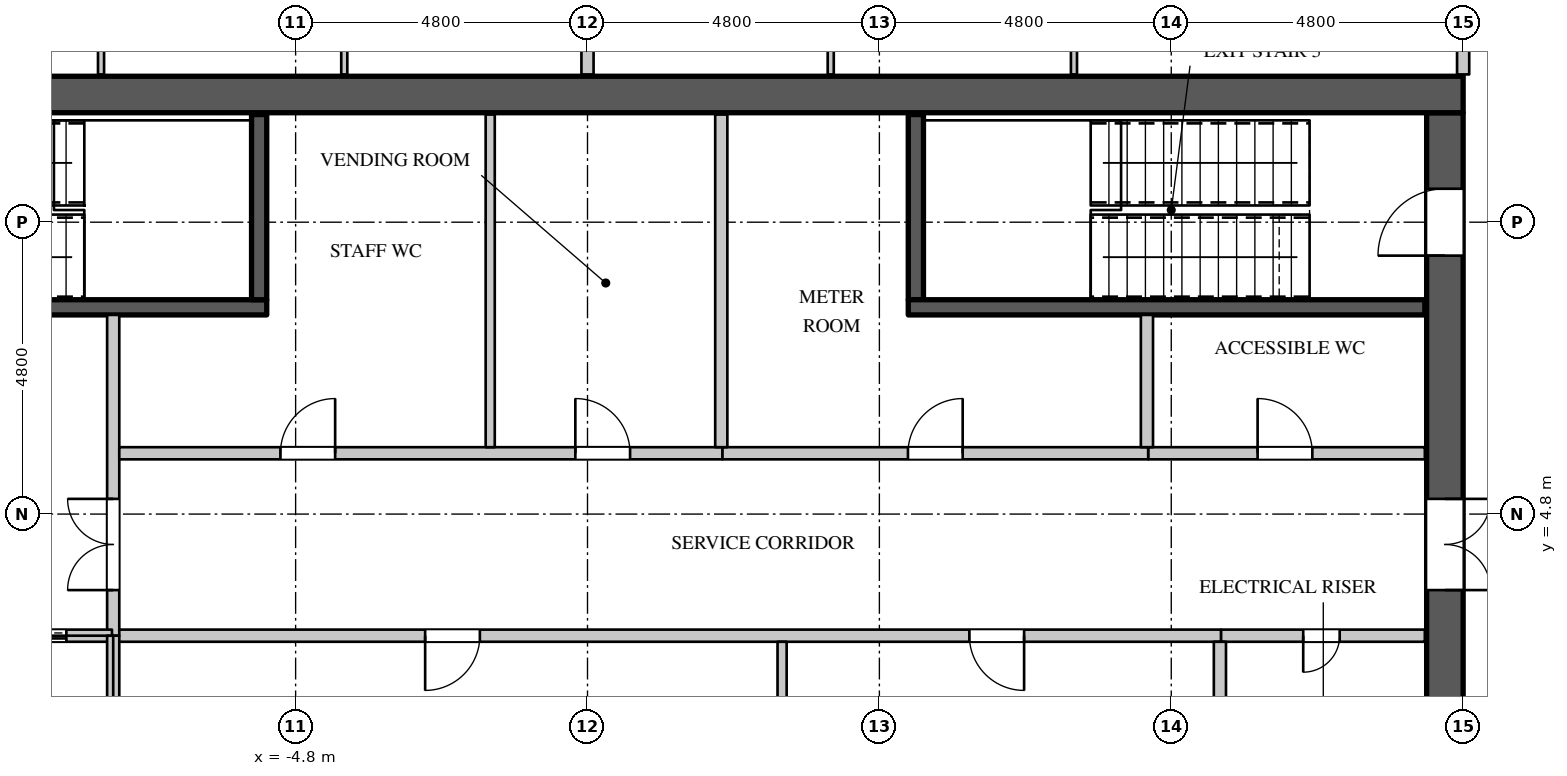
"""IFC4 building model, lengths in metres.
Left out: names, types, materials, properties, quantities, classifications, styles, units other than length and angle.
Written with IfcOpenShell. Run it as: python <this file> out.ifc"""

import sys

from ifc_helpers import new_model, si_unit, direction, frame, frame_2d, origin, place, context, subcontext, project, spatial, rectangle, extrude, element, fill, save


model = new_model("IFC4")
c1 = context("Model", 3, precision=1e-05, world=origin(), true_north=direction((0.0, 1.0)))
c2 = subcontext(c1, "Body", "Model", "MODEL_VIEW")
j1 = project(units=[si_unit("LENGTHUNIT", "METRE"), si_unit("PLANEANGLEUNIT", "RADIAN")], contexts=[c1])
p1 = place(None, origin())
s1 = spatial("IfcSite", under=j1, at=p1, CompositionType="ELEMENT")
p2 = place(p1, origin())
s2 = spatial("IfcBuilding", under=s1, at=p2, CompositionType="ELEMENT")
p3 = place(p2, frame((0.0, 0.0, 239.1)))
s3 = spatial("IfcBuildingStorey", under=s2, at=p3, CompositionType="ELEMENT", Elevation=239.1)
p4 = place(p3, frame((-14.4, 11.7, 0.0), z_axis=(0.0, 0.0, 1.0), x_axis=(1.0, 0.0, 0.0)))
e1 = element("IfcWall", 1, at=p4, inside=s3, PredefinedType="SHEAR", context=c2, shape_type="SweptSolid", body=[
    extrude(rectangle(XDim=28.8, YDim=0.6, at=frame_2d((14.4, 0.0))), origin(), (0.0, 0.0, 1.0), 4.2),
])
p5 = place(p3, frame((14.1, -11.4, 0.0), z_axis=(0.0, 0.0, 1.0), x_axis=(0.0, 1.0, 0.0)))
e2 = element("IfcWall", 2, at=p5, inside=s3, PredefinedType="SHEAR", context=c2, shape_type="SweptSolid", body=[
    extrude(rectangle(XDim=22.8, YDim=0.6, at=frame_2d((11.4, 0.0))), origin(), (0.0, 0.0, 1.0), 4.2),
])
p6 = place(p5, frame((20.45, 0.0, 0.0)))
e3 = element("IfcOpeningElement", 3, at=p6, cuts=e2, PredefinedType="OPENING", context=c2, shape_type="SweptSolid", body=[
    extrude(rectangle(XDim=1.1, YDim=2.2, at=frame_2d((0.55, 1.1))), frame((0.0, 0.31, 0.0), z_axis=(0.0, -1.0, 0.0), x_axis=(1.0, 0.0, 0.0)), (0.0, 0.0, 1.0), 0.62),
])
p7 = place(p5, frame((1.25, 0.0, 0.0)))
e4 = element("IfcOpeningElement", 4, at=p7, cuts=e2, PredefinedType="OPENING", context=c2, shape_type="SweptSolid", body=[
    extrude(rectangle(XDim=1.1, YDim=2.2, at=frame_2d((0.55, 1.1))), frame((0.0, 0.31, 0.0), z_axis=(0.0, -1.0, 0.0), x_axis=(1.0, 0.0, 0.0)), (0.0, 0.0, 1.0), 0.62),
])
p8 = place(p5, frame((14.95, 0.0, 0.0)))
e5 = element("IfcOpeningElement", 5, at=p8, cuts=e2, PredefinedType="OPENING", context=c2, shape_type="SweptSolid", body=[
    extrude(rectangle(XDim=1.5, YDim=2.4, at=frame_2d((0.75, 1.2))), frame((0.0, 0.31, 0.0), z_axis=(0.0, -1.0, 0.0), x_axis=(1.0, 0.0, 0.0)), (0.0, 0.0, 1.0), 0.62),
])
p9 = place(p5, frame((6.35, 0.0, 0.0)))
e6 = element("IfcOpeningElement", 6, at=p9, cuts=e2, PredefinedType="OPENING", context=c2, shape_type="SweptSolid", body=[
    extrude(rectangle(XDim=1.5, YDim=2.4, at=frame_2d((0.75, 1.2))), frame((0.0, 0.31, 0.0), z_axis=(0.0, -1.0, 0.0), x_axis=(1.0, 0.0, 0.0)), (0.0, 0.0, 1.0), 0.62),
])
p10 = place(p3, frame((-7.82, 2.8, 0.0), z_axis=(0.0, 0.0, 1.0), x_axis=(1.0, 0.0, 0.0)))
e7 = element("IfcWall", 7, at=p10, inside=s3, PredefinedType="PARTITIONING", context=c2, shape_type="SweptSolid", body=[
    extrude(rectangle(XDim=18.24, YDim=0.2, at=frame_2d((9.12, 0.0))), origin(), (0.0, 0.0, 1.0), 3.95),
])
p11 = place(p10, frame((5.15, 0.0, 0.0)))
e8 = element("IfcOpeningElement", 8, at=p11, cuts=e7, PredefinedType="OPENING", context=c2, shape_type="SweptSolid", body=[
    extrude(rectangle(XDim=0.9, YDim=2.2, at=frame_2d((0.45, 1.1))), frame((0.0, 0.11, 0.0), z_axis=(0.0, -1.0, 0.0), x_axis=(1.0, 0.0, 0.0)), (0.0, 0.0, 1.0), 0.22),
])
p12 = place(p10, frame((14.1, 0.0, 0.0)))
e9 = element("IfcOpeningElement", 9, at=p12, cuts=e7, PredefinedType="OPENING", context=c2, shape_type="SweptSolid", body=[
    extrude(rectangle(XDim=0.9, YDim=2.2, at=frame_2d((0.45, 1.1))), frame((0.0, 0.11, 0.0), z_axis=(0.0, -1.0, 0.0), x_axis=(1.0, 0.0, 0.0)), (0.0, 0.0, 1.0), 0.22),
])
p13 = place(p3, frame((-7.8, 2.8, 0.0), z_axis=(0.0, 0.0, 1.0), x_axis=(0.0, 1.0, 0.0)))
e10 = element("IfcWall", 10, at=p13, inside=s3, PredefinedType="PARTITIONING", context=c2, shape_type="SweptSolid", body=[
    extrude(rectangle(XDim=5.275, YDim=0.2, at=frame_2d((2.637, 0.0))), origin(), (0.0, 0.0, 1.0), 3.95),
])
p14 = place(p13, frame((0.75, 0.0, 0.0)))
e11 = element("IfcOpeningElement", 11, at=p14, cuts=e10, PredefinedType="OPENING", context=c2, shape_type="SweptSolid", body=[
    extrude(rectangle(XDim=1.5, YDim=2.4, at=frame_2d((0.75, 1.2))), frame((0.0, 0.11, 0.0), z_axis=(0.0, -1.0, 0.0), x_axis=(1.0, 0.0, 0.0)), (0.0, 0.0, 1.0), 0.22),
])
p15 = place(p3, frame((-7.7, 5.8, 0.0), z_axis=(0.0, 0.0, 1.0), x_axis=(1.0, 0.0, 0.0)))
e12 = element("IfcWall", 12, at=p15, inside=s3, PredefinedType="PARTITIONING", context=c2, shape_type="SweptSolid", body=[
    extrude(rectangle(XDim=9.92, YDim=0.2, at=frame_2d((4.96, 0.0))), origin(), (0.0, 0.0, 1.0), 3.95),
])
p16 = place(p15, frame((2.65, 0.0, 0.0)))
e13 = element("IfcOpeningElement", 13, at=p16, cuts=e12, PredefinedType="OPENING", context=c2, shape_type="SweptSolid", body=[
    extrude(rectangle(XDim=0.9, YDim=2.2, at=frame_2d((0.45, 1.1))), frame((0.0, 0.11, 0.0), z_axis=(0.0, -1.0, 0.0), x_axis=(1.0, 0.0, 0.0)), (0.0, 0.0, 1.0), 0.22),
])
p17 = place(p15, frame((7.5, 0.0, 0.0)))
e14 = element("IfcOpeningElement", 14, at=p17, cuts=e12, PredefinedType="OPENING", context=c2, shape_type="SweptSolid", body=[
    extrude(rectangle(XDim=0.9, YDim=2.2, at=frame_2d((0.45, 1.1))), frame((0.0, 0.11, 0.0), z_axis=(0.0, -1.0, 0.0), x_axis=(1.0, 0.0, 0.0)), (0.0, 0.0, 1.0), 0.22),
])
p18 = place(p3, frame((9.22, 5.8, 0.0), z_axis=(0.0, 0.0, 1.0), x_axis=(1.0, 0.0, 0.0)))
e15 = element("IfcWall", 15, at=p18, inside=s3, PredefinedType="PARTITIONING", context=c2, shape_type="SweptSolid", body=[
    extrude(rectangle(XDim=4.55, YDim=0.2, at=frame_2d((2.275, 0.0))), origin(), (0.0, 0.0, 1.0), 3.95),
])
p19 = place(p18, frame((1.8, 0.0, 0.0)))
e16 = element("IfcOpeningElement", 16, at=p19, cuts=e15, PredefinedType="OPENING", context=c2, shape_type="SweptSolid", body=[
    extrude(rectangle(XDim=0.9, YDim=2.2, at=frame_2d((0.45, 1.1))), frame((0.0, 0.11, 0.0), z_axis=(0.0, -1.0, 0.0), x_axis=(1.0, 0.0, 0.0)), (0.0, 0.0, 1.0), 0.22),
])
p20 = place(p3, frame((14.4, 12.03, 0.0), z_axis=(0.0, 0.0, 1.0), x_axis=(0.0, 1.0, 0.0)))
e17 = element("IfcWall", 17, at=p20, inside=s3, PredefinedType="PARTITIONING", context=c2, shape_type="SweptSolid", body=[
    extrude(rectangle(XDim=2.27, YDim=0.2, at=frame_2d((1.135, 0.0))), origin(), (0.0, 0.0, 1.0), 3.95),
])
p21 = place(p3, frame((-1.6, 5.9, 0.0), z_axis=(0.0, 0.0, 1.0), x_axis=(0.0, 1.0, 0.0)))
e18 = element("IfcWall", 18, at=p21, inside=s3, PredefinedType="PARTITIONING", context=c2, shape_type="SweptSolid", body=[
    extrude(rectangle(XDim=5.47, YDim=0.15, at=frame_2d((2.735, 0.0))), origin(), (0.0, 0.0, 1.0), 3.95),
])
p22 = place(p3, frame((3.2, 0.1, 0.0), z_axis=(0.0, 0.0, 1.0), x_axis=(0.0, 1.0, 0.0)))
e19 = element("IfcWall", 19, at=p22, inside=s3, PredefinedType="PARTITIONING", context=c2, shape_type="SweptSolid", body=[
    extrude(rectangle(XDim=2.6, YDim=0.15, at=frame_2d((1.3, 0.0))), origin(), (0.0, 0.0, 1.0), 3.95),
])
p23 = place(p3, frame((0.0, 12.03, 0.0), z_axis=(0.0, 0.0, 1.0), x_axis=(0.0, 1.0, 0.0)))
e20 = element("IfcWall", 20, at=p23, inside=s3, PredefinedType="PARTITIONING", context=c2, shape_type="SweptSolid", body=[
    extrude(rectangle(XDim=14.395, YDim=0.2, at=frame_2d((7.198, 0.0))), origin(), (0.0, 0.0, 1.0), 3.95),
])
p24 = place(p3, frame((2.22, 5.8, 0.0), z_axis=(0.0, 0.0, 1.0), x_axis=(1.0, 0.0, 0.0)))
e21 = element("IfcWall", 21, at=p24, inside=s3, PredefinedType="PARTITIONING", context=c2, shape_type="SweptSolid", body=[
    extrude(rectangle(XDim=7.0, YDim=0.2, at=frame_2d((3.5, 0.0))), origin(), (0.0, 0.0, 1.0), 3.95),
])
p25 = place(p24, frame((3.05, 0.0, 0.0)))
e22 = element("IfcOpeningElement", 22, at=p25, cuts=e21, PredefinedType="OPENING", context=c2, shape_type="SweptSolid", body=[
    extrude(rectangle(XDim=0.9, YDim=2.2, at=frame_2d((0.45, 1.1))), frame((0.0, 0.11, 0.0), z_axis=(0.0, -1.0, 0.0), x_axis=(1.0, 0.0, 0.0)), (0.0, 0.0, 1.0), 0.22),
])
p26 = place(p3, frame((2.2, 5.9, 0.0), z_axis=(0.0, 0.0, 1.0), x_axis=(0.0, 1.0, 0.0)))
e23 = element("IfcWall", 23, at=p26, inside=s3, PredefinedType="PARTITIONING", context=c2, shape_type="SweptSolid", body=[
    extrude(rectangle(XDim=5.47, YDim=0.2, at=frame_2d((2.735, 0.0))), origin(), (0.0, 0.0, 1.0), 3.95),
])
p27 = place(p3, frame((9.2, 5.9, 0.0), z_axis=(0.0, 0.0, 1.0), x_axis=(0.0, 1.0, 0.0)))
e24 = element("IfcWall", 24, at=p27, inside=s3, PredefinedType="PARTITIONING", context=c2, shape_type="SweptSolid", body=[
    extrude(rectangle(XDim=2.175, YDim=0.2, at=frame_2d((1.087, 0.0))), origin(), (0.0, 0.0, 1.0), 3.95),
])
p28 = place(p3, frame((10.42, 2.8, 0.0), z_axis=(0.0, 0.0, 1.0), x_axis=(1.0, 0.0, 0.0)))
e25 = element("IfcWall", 25, at=p28, inside=s3, PredefinedType="PARTITIONING", context=c2, shape_type="SweptSolid", body=[
    extrude(rectangle(XDim=3.35, YDim=0.2, at=frame_2d((1.675, 0.0))), origin(), (0.0, 0.0, 1.0), 3.95),
])
p29 = place(p28, frame((1.35, 0.0, 0.0)))
e26 = element("IfcOpeningElement", 26, at=p29, cuts=e25, PredefinedType="OPENING", context=c2, shape_type="SweptSolid", body=[
    extrude(rectangle(XDim=0.6, YDim=2.0, at=frame_2d((0.3, 1.0))), frame((0.0, 0.11, 0.0), z_axis=(0.0, -1.0, 0.0), x_axis=(1.0, 0.0, 0.0)), (0.0, 0.0, 1.0), 0.22),
])
p30 = place(p3, frame((10.4, 0.1, 0.0), z_axis=(0.0, 0.0, 1.0), x_axis=(0.0, 1.0, 0.0)))
e27 = element("IfcWall", 27, at=p30, inside=s3, PredefinedType="PARTITIONING", context=c2, shape_type="SweptSolid", body=[
    extrude(rectangle(XDim=2.6, YDim=0.2, at=frame_2d((1.3, 0.0))), origin(), (0.0, 0.0, 1.0), 3.95),
])
p31 = place(p3, frame((-13.77, 2.8, 0.0), z_axis=(0.0, 0.0, 1.0), x_axis=(1.0, 0.0, 0.0)))
e28 = element("IfcWall", 28, at=p31, inside=s3, PredefinedType="PARTITIONING", context=c2, shape_type="SweptSolid", body=[
    extrude(rectangle(XDim=5.95, YDim=0.2, at=frame_2d((2.975, 0.0))), origin(), (0.0, 0.0, 1.0), 3.95),
])
p32 = place(p31, frame((1.1, 0.0, 0.0)))
e29 = element("IfcOpeningElement", 29, at=p32, cuts=e28, PredefinedType="OPENING", context=c2, shape_type="SweptSolid", body=[
    extrude(rectangle(XDim=1.1, YDim=2.2, at=frame_2d((0.55, 1.1))), frame((0.0, 0.11, 0.0), z_axis=(0.0, -1.0, 0.0), x_axis=(1.0, 0.0, 0.0)), (0.0, 0.0, 1.0), 0.22),
])
p33 = place(p31, frame((4.1, 0.0, 0.0)))
e30 = element("IfcOpeningElement", 30, at=p33, cuts=e28, PredefinedType="OPENING", context=c2, shape_type="SweptSolid", body=[
    extrude(rectangle(XDim=1.1, YDim=2.2, at=frame_2d((0.55, 1.1))), frame((0.0, 0.11, 0.0), z_axis=(0.0, -1.0, 0.0), x_axis=(1.0, 0.0, 0.0)), (0.0, 0.0, 1.0), 0.22),
])
p34 = place(p3, frame((-7.8, 0.0, 0.0), z_axis=(0.0, 0.0, 1.0), x_axis=(0.0, 1.0, 0.0)))
e31 = element("IfcWall", 31, at=p34, inside=s3, PredefinedType="PARTITIONING", context=c2, shape_type="SweptSolid", body=[
    extrude(rectangle(XDim=2.8, YDim=0.2, at=frame_2d((1.4, 0.0))), origin(), (0.0, 0.0, 1.0), 3.95),
])
p35 = place(p3, frame((-13.77, 8.2, 0.0), z_axis=(0.0, 0.0, 1.0), x_axis=(1.0, 0.0, 0.0)))
e32 = element("IfcWall", 32, at=p35, inside=s3, PredefinedType="SHEAR", context=c2, shape_type="SweptSolid", body=[
    extrude(rectangle(XDim=8.495, YDim=0.25, at=frame_2d((4.248, 0.0))), origin(), (0.0, 0.0, 1.0), 3.95),
])
p36 = place(p35, frame((0.15, 0.0, 0.0)))
e33 = element("IfcOpeningElement", 33, at=p36, cuts=e32, PredefinedType="OPENING", context=c2, shape_type="SweptSolid", body=[
    extrude(rectangle(XDim=1.1, YDim=2.2, at=frame_2d((0.55, 1.1))), frame((0.0, 0.135, 0.0), z_axis=(0.0, -1.0, 0.0), x_axis=(1.0, 0.0, 0.0)), (0.0, 0.0, 1.0), 0.27),
])
for number, where, z_axis, x_axis in (
    (34, (-5.4, 8.325, 0.0), (0.0, 0.0, 1.0), (0.0, 1.0, 0.0)),
    (35, (5.4, 8.325, 0.0), (0.0, 0.0, 1.0), (0.0, 1.0, 0.0)),
):
    element("IfcWall", number, at=place(p3, frame(where, z_axis=z_axis, x_axis=x_axis)), inside=s3, PredefinedType="SHEAR", context=c2, shape_type="SweptSolid", body=[
        extrude(rectangle(XDim=3.045, YDim=0.25, at=frame_2d((1.522, 0.0))), origin(), (0.0, 0.0, 1.0), 3.95),
    ])
p37 = place(p3, frame((5.275, 8.2, 0.0), z_axis=(0.0, 0.0, 1.0), x_axis=(1.0, 0.0, 0.0)))
e36 = element("IfcWall", 36, at=p37, inside=s3, PredefinedType="SHEAR", context=c2, shape_type="SweptSolid", body=[
    extrude(rectangle(XDim=8.495, YDim=0.25, at=frame_2d((4.248, 0.0))), origin(), (0.0, 0.0, 1.0), 3.95),
])
p38 = place(p3, frame((-8.0, 12.03, 0.0), z_axis=(0.0, 0.0, 1.0), x_axis=(0.0, 1.0, 0.0)))
e37 = element("IfcWall", 37, at=p38, inside=s3, PredefinedType="PARTITIONING", context=c2, shape_type="SweptSolid", body=[
    extrude(rectangle(XDim=6.395, YDim=0.1, at=frame_2d((3.198, 0.0))), origin(), (0.0, 0.0, 1.0), 3.95),
])
p39 = place(p38, frame((2.75, 0.0, 0.0)))
e38 = element("IfcOpeningElement", 38, at=p39, cuts=e37, PredefinedType="OPENING", context=c2, shape_type="SweptSolid", body=[
    extrude(rectangle(XDim=0.9, YDim=2.2, at=frame_2d((0.45, 1.1))), frame((0.0, 0.06, 0.0), z_axis=(0.0, -1.0, 0.0), x_axis=(1.0, 0.0, 0.0)), (0.0, 0.0, 1.0), 0.12),
])
p40 = place(p3, frame((-4.0, 12.03, 0.0), z_axis=(0.0, 0.0, 1.0), x_axis=(0.0, 1.0, 0.0)))
e39 = element("IfcWall", 39, at=p40, inside=s3, PredefinedType="PARTITIONING", context=c2, shape_type="SweptSolid", body=[
    extrude(rectangle(XDim=5.92, YDim=0.1, at=frame_2d((2.96, 0.0))), origin(), (0.0, 0.0, 1.0), 3.95),
])
p41 = place(p3, frame((4.0, 12.03, 0.0), z_axis=(0.0, 0.0, 1.0), x_axis=(0.0, 1.0, 0.0)))
e40 = element("IfcWall", 40, at=p41, inside=s3, PredefinedType="PARTITIONING", context=c2, shape_type="SweptSolid", body=[
    extrude(rectangle(XDim=5.895, YDim=0.1, at=frame_2d((2.948, 0.0))), origin(), (0.0, 0.0, 1.0), 3.95),
])
p42 = place(p3, frame((8.0, 12.03, 0.0), z_axis=(0.0, 0.0, 1.0), x_axis=(0.0, 1.0, 0.0)))
e41 = element("IfcWall", 41, at=p42, inside=s3, PredefinedType="PARTITIONING", context=c2, shape_type="SweptSolid", body=[
    extrude(rectangle(XDim=6.395, YDim=0.1, at=frame_2d((3.198, 0.0))), origin(), (0.0, 0.0, 1.0), 3.95),
])
p43 = place(p42, frame((2.75, 0.0, 0.0)))
e42 = element("IfcOpeningElement", 42, at=p43, cuts=e41, PredefinedType="OPENING", context=c2, shape_type="SweptSolid", body=[
    extrude(rectangle(XDim=0.9, YDim=2.2, at=frame_2d((0.45, 1.1))), frame((0.0, 0.06, 0.0), z_axis=(0.0, -1.0, 0.0), x_axis=(1.0, 0.0, 0.0)), (0.0, 0.0, 1.0), 0.12),
])
p44 = place(p29, origin())
e43 = element("IfcDoor", 43, at=p44, inside=s3, OperationType="SINGLE_SWING_RIGHT", PredefinedType="DOOR", context=c2, shape_type="SweptSolid", body=[
    extrude(rectangle(XDim=0.6, YDim=2.0, at=frame_2d((0.3, 1.0))), frame((0.0, 0.025, 0.0), z_axis=(0.0, -1.0, 0.0), x_axis=(1.0, 0.0, 0.0)), (0.0, 0.0, 1.0), 0.05),
])
fill(e26, e43)
p45 = place(p16, origin())
e44 = element("IfcDoor", 44, at=p45, inside=s3, OperationType="SINGLE_SWING_RIGHT", PredefinedType="DOOR", context=c2, shape_type="SweptSolid", body=[
    extrude(rectangle(XDim=0.9, YDim=2.2, at=frame_2d((0.45, 1.1))), frame((0.0, 0.025, 0.0), z_axis=(0.0, -1.0, 0.0), x_axis=(1.0, 0.0, 0.0)), (0.0, 0.0, 1.0), 0.05),
])
fill(e13, e44)
p46 = place(p17, origin())
e45 = element("IfcDoor", 45, at=p46, inside=s3, OperationType="SINGLE_SWING_LEFT", PredefinedType="DOOR", context=c2, shape_type="SweptSolid", body=[
    extrude(rectangle(XDim=0.9, YDim=2.2, at=frame_2d((0.45, 1.1))), frame((0.0, 0.025, 0.0), z_axis=(0.0, -1.0, 0.0), x_axis=(1.0, 0.0, 0.0)), (0.0, 0.0, 1.0), 0.05),
])
fill(e14, e45)
p47 = place(p25, origin())
e46 = element("IfcDoor", 46, at=p47, inside=s3, OperationType="SINGLE_SWING_RIGHT", PredefinedType="DOOR", context=c2, shape_type="SweptSolid", body=[
    extrude(rectangle(XDim=0.9, YDim=2.2, at=frame_2d((0.45, 1.1))), frame((0.0, 0.025, 0.0), z_axis=(0.0, -1.0, 0.0), x_axis=(1.0, 0.0, 0.0)), (0.0, 0.0, 1.0), 0.05),
])
fill(e22, e46)
p48 = place(p19, origin())
e47 = element("IfcDoor", 47, at=p48, inside=s3, OperationType="SINGLE_SWING_LEFT", PredefinedType="DOOR", context=c2, shape_type="SweptSolid", body=[
    extrude(rectangle(XDim=0.9, YDim=2.2, at=frame_2d((0.45, 1.1))), frame((0.0, 0.025, 0.0), z_axis=(0.0, -1.0, 0.0), x_axis=(1.0, 0.0, 0.0)), (0.0, 0.0, 1.0), 0.05),
])
fill(e16, e47)
p49 = place(p11, origin())
e48 = element("IfcDoor", 48, at=p49, inside=s3, OperationType="SINGLE_SWING_RIGHT", PredefinedType="DOOR", context=c2, shape_type="SweptSolid", body=[
    extrude(rectangle(XDim=0.9, YDim=2.2, at=frame_2d((0.45, 1.1))), frame((0.0, 0.025, 0.0), z_axis=(0.0, -1.0, 0.0), x_axis=(1.0, 0.0, 0.0)), (0.0, 0.0, 1.0), 0.05),
])
fill(e8, e48)
p50 = place(p12, origin())
e49 = element("IfcDoor", 49, at=p50, inside=s3, OperationType="SINGLE_SWING_LEFT", PredefinedType="DOOR", context=c2, shape_type="SweptSolid", body=[
    extrude(rectangle(XDim=0.9, YDim=2.2, at=frame_2d((0.45, 1.1))), frame((0.0, 0.025, 0.0), z_axis=(0.0, -1.0, 0.0), x_axis=(1.0, 0.0, 0.0)), (0.0, 0.0, 1.0), 0.05),
])
fill(e9, e49)
p51 = place(p33, origin())
e50 = element("IfcDoor", 50, at=p51, inside=s3, OperationType="DOUBLE_DOOR_SLIDING", PredefinedType="DOOR", context=c2, shape_type="SweptSolid", body=[
    extrude(rectangle(XDim=1.1, YDim=2.2, at=frame_2d((0.55, 1.1))), frame((0.0, 0.025, 0.0), z_axis=(0.0, -1.0, 0.0), x_axis=(1.0, 0.0, 0.0)), (0.0, 0.0, 1.0), 0.05),
])
fill(e30, e50)
p52 = place(p14, origin())
e51 = element("IfcDoor", 51, at=p52, inside=s3, OperationType="DOUBLE_DOOR_SINGLE_SWING", PredefinedType="DOOR", context=c2, shape_type="SweptSolid", body=[
    extrude(rectangle(XDim=1.5, YDim=2.4, at=frame_2d((0.75, 1.2))), frame((0.0, 0.025, 0.0), z_axis=(0.0, -1.0, 0.0), x_axis=(1.0, 0.0, 0.0)), (0.0, 0.0, 1.0), 0.05),
])
fill(e11, e51)
p53 = place(p6, origin())
e52 = element("IfcDoor", 52, at=p53, inside=s3, OperationType="SINGLE_SWING_LEFT", PredefinedType="DOOR", context=c2, shape_type="SweptSolid", body=[
    extrude(rectangle(XDim=1.1, YDim=2.2, at=frame_2d((0.55, 1.1))), frame((0.0, 0.295, 0.0), z_axis=(0.0, -1.0, 0.0), x_axis=(1.0, 0.0, 0.0)), (0.0, 0.0, 1.0), 0.05),
])
fill(e3, e52)
p54 = place(p8, origin())
e53 = element("IfcDoor", 53, at=p54, inside=s3, OperationType="DOUBLE_DOOR_SINGLE_SWING", PredefinedType="DOOR", context=c2, shape_type="SweptSolid", body=[
    extrude(rectangle(XDim=1.5, YDim=2.4, at=frame_2d((0.75, 1.2))), frame((0.0, -0.245, 0.0), z_axis=(0.0, -1.0, 0.0), x_axis=(1.0, 0.0, 0.0)), (0.0, 0.0, 1.0), 0.05),
])
fill(e5, e53)
save(model, sys.argv[1])
